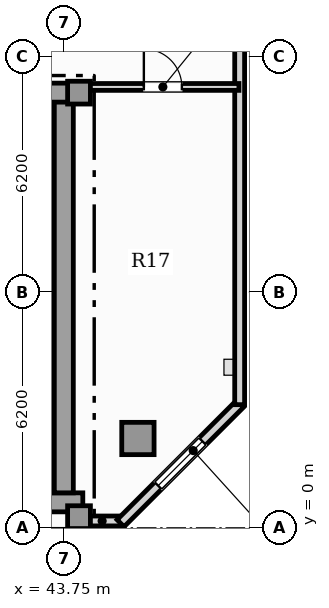
"""IFC4 building model, lengths in metres.
Left out: names, types, materials, properties, quantities, classifications, styles, units other than length and angle.
Written with IfcOpenShell. Run it as: python <this file> out.ifc"""

import sys

from ifc_helpers import new_model, si_unit, direction, frame, frame_2d, origin, origin_2d, place, context, subcontext, project, spatial, rectangle, hollow_rectangle, extrude, element, fill, save


model = new_model("IFC4")
c1 = context("Model", 3, precision=1e-05, world=origin(), true_north=direction((0.0, 1.0)))
c2 = subcontext(c1, "Body", "Model", "MODEL_VIEW")
j1 = project(units=[si_unit("LENGTHUNIT", "METRE"), si_unit("PLANEANGLEUNIT", "RADIAN")], contexts=[c1])
p1 = place(None, origin())
s1 = spatial("IfcSite", under=j1, at=p1, CompositionType="ELEMENT")
p2 = place(p1, origin())
s2 = spatial("IfcBuilding", under=s1, at=p2, CompositionType="ELEMENT")
p3 = place(p2, frame((0.0, 0.0, 316.9)))
s3 = spatial("IfcBuildingStorey", under=s2, at=p3, CompositionType="ELEMENT", Elevation=316.9)
p4 = place(p3, frame((13.25, 0.67, 0.0), z_axis=(0.0, 0.0, 1.0), x_axis=(1.0, 0.0, 0.0)))
e1 = element("IfcWall", 1, at=p4, inside=s3, PredefinedType="SHEAR", context=c2, shape_type="SweptSolid", body=[
    extrude(rectangle(XDim=31.0, YDim=0.5, at=frame_2d((15.5, 0.0))), origin(), (0.0, 0.0, 1.0), 3.65),
])
p5 = place(p3, frame((43.75, 0.92, 0.0), z_axis=(0.0, 0.0, 1.0), x_axis=(0.0, 1.0, 0.0)))
e2 = element("IfcWall", 2, at=p5, inside=s3, PredefinedType="SHEAR", context=c2, shape_type="SweptSolid", body=[
    extrude(rectangle(XDim=10.53, YDim=0.5, at=frame_2d((5.265, 0.0))), origin(), (0.0, 0.0, 1.0), 3.65),
])
p6 = place(p3, frame((41.3, 11.45, 0.0), z_axis=(0.0, 0.0, 1.0), x_axis=(1.0, 0.0, 0.0)))
e3 = element("IfcWall", 3, at=p6, inside=s3, PredefinedType="SHEAR", context=c2, shape_type="SweptSolid", body=[
    extrude(rectangle(XDim=2.95, YDim=0.5, at=frame_2d((1.475, 0.0))), origin(), (0.0, 0.0, 1.0), 3.65),
])
for number, where, z_axis, x_axis in (
    (4, (44.15, 0.28, 0.0), (0.0, 0.0, 1.0), (1.0, 0.0, 0.0)),
    (5, (44.15, 11.45, 0.0), (0.0, 0.0, 1.0), (1.0, 0.0, 0.0)),
):
    element("IfcColumn", number, at=place(p3, frame(where, z_axis=z_axis, x_axis=x_axis)), inside=s3, PredefinedType="COLUMN", context=c2, shape_type="SweptSolid", body=[
        extrude(rectangle(XDim=0.6, YDim=0.6, at=origin_2d()), origin(), (0.0, 0.0, 1.0), 3.85),
    ])
p7 = place(p3, frame((45.7, 2.35, 0.0), z_axis=(0.0, 0.0, 1.0), x_axis=(1.0, 0.0, 0.0)))
e6 = element("IfcColumn", 6, at=p7, inside=s3, PredefinedType="USERDEFINED", context=c2, shape_type="SweptSolid", body=[
    extrude(hollow_rectangle(XDim=0.85, YDim=0.85, WallThickness=0.05, at=origin_2d()), origin(), (0.0, 0.0, 1.0), 3.85),
])
p8 = place(p3, frame((44.25, 0.18, 0.0), z_axis=(0.0, 0.0, 1.0), x_axis=(1.0, 0.0, 0.0)))
e7 = element("IfcWall", 7, at=p8, inside=s3, PredefinedType="SOLIDWALL", context=c2, shape_type="SweptSolid", body=[
    extrude(rectangle(XDim=1.017, YDim=0.26, at=frame_2d((0.509, 0.0))), origin(), (0.0, 0.0, 1.0), 3.65),
])
p9 = place(p3, frame((45.243, 0.12, 0.0), z_axis=(0.0, 0.0, 1.0), x_axis=(0.707079321262, 0.707134240044, 0.0)))
e8 = element("IfcWall", 8, at=p9, inside=s3, PredefinedType="SOLIDWALL", context=c2, shape_type="SweptSolid", body=[
    extrude(rectangle(XDim=4.446, YDim=0.26, at=frame_2d((2.223, 0.0))), origin(), (0.0, 0.0, 1.0), 3.65),
])
p10 = place(p9, frame((1.398, 0.0, 0.88)))
e9 = element("IfcOpeningElement", 9, at=p10, cuts=e8, PredefinedType="OPENING", context=c2, shape_type="SweptSolid", body=[
    extrude(rectangle(XDim=1.65, YDim=2.0, at=frame_2d((0.825, 1.0))), frame((0.0, 0.14, 0.0), z_axis=(0.0, -1.0, 0.0), x_axis=(1.0, 0.0, 0.0)), (0.0, 0.0, 1.0), 0.28),
])
p11 = place(p3, frame((48.377, 3.24, 0.0), z_axis=(0.0, 0.0, 1.0), x_axis=(0.0, 1.0, 0.0)))
e10 = element("IfcWall", 10, at=p11, inside=s3, PredefinedType="SOLIDWALL", context=c2, shape_type="SweptSolid", body=[
    extrude(rectangle(XDim=26.402, YDim=0.26, at=frame_2d((13.201, 0.0))), origin(), (0.0, 0.0, 1.0), 3.65),
])
p12 = place(p11, frame((12.856, 0.0, 0.88)))
e11 = element("IfcOpeningElement", 11, at=p12, cuts=e10, PredefinedType="OPENING", context=c2, shape_type="SweptSolid", body=[
    extrude(rectangle(XDim=1.65, YDim=2.0, at=frame_2d((0.825, 1.0))), frame((0.0, 0.14, 0.0), z_axis=(0.0, -1.0, 0.0), x_axis=(1.0, 0.0, 0.0)), (0.0, 0.0, 1.0), 0.28),
])
p13 = place(p11, frame((15.274, 0.0, 0.88)))
e12 = element("IfcOpeningElement", 12, at=p13, cuts=e10, PredefinedType="OPENING", context=c2, shape_type="SweptSolid", body=[
    extrude(rectangle(XDim=1.65, YDim=2.0, at=frame_2d((0.825, 1.0))), frame((0.0, 0.14, 0.0), z_axis=(0.0, -1.0, 0.0), x_axis=(1.0, 0.0, 0.0)), (0.0, 0.0, 1.0), 0.28),
])
p14 = place(p11, frame((17.961, 0.0, 0.88)))
e13 = element("IfcOpeningElement", 13, at=p14, cuts=e10, PredefinedType="OPENING", context=c2, shape_type="SweptSolid", body=[
    extrude(rectangle(XDim=1.65, YDim=2.0, at=frame_2d((0.825, 1.0))), frame((0.0, 0.14, 0.0), z_axis=(0.0, -1.0, 0.0), x_axis=(1.0, 0.0, 0.0)), (0.0, 0.0, 1.0), 0.28),
])
p15 = place(p11, frame((21.212, 0.0, 0.88)))
e14 = element("IfcOpeningElement", 14, at=p15, cuts=e10, PredefinedType="OPENING", context=c2, shape_type="SweptSolid", body=[
    extrude(rectangle(XDim=1.65, YDim=2.0, at=frame_2d((0.825, 1.0))), frame((0.0, 0.14, 0.0), z_axis=(0.0, -1.0, 0.0), x_axis=(1.0, 0.0, 0.0)), (0.0, 0.0, 1.0), 0.28),
])
p16 = place(p3, frame((40.06, 8.52, 0.0), z_axis=(0.0, 0.0, 1.0), x_axis=(1.0, 0.0, 0.0)))
e15 = element("IfcWall", 15, at=p16, inside=s3, PredefinedType="SOLIDWALL", context=c2, shape_type="SweptSolid", body=[
    extrude(rectangle(XDim=3.4, YDim=0.22, at=frame_2d((1.7, 0.0))), origin(), (0.0, 0.0, 1.0), 3.65),
])
p17 = place(p16, frame((1.125, 0.0, 0.0)))
e16 = element("IfcOpeningElement", 16, at=p17, cuts=e15, PredefinedType="OPENING", context=c2, shape_type="SweptSolid", body=[
    extrude(rectangle(XDim=1.15, YDim=2.2, at=frame_2d((0.575, 1.1))), frame((0.0, 0.12, 0.0), z_axis=(0.0, -1.0, 0.0), x_axis=(1.0, 0.0, 0.0)), (0.0, 0.0, 1.0), 0.24),
])
p18 = place(p3, frame((44.355, 11.6, 0.0), z_axis=(0.0, 0.0, 1.0), x_axis=(1.0, 0.0, 0.0)))
e17 = element("IfcWall", 17, at=p18, inside=s3, PredefinedType="PARTITIONING", context=c2, shape_type="SweptSolid", body=[
    extrude(rectangle(XDim=4.002, YDim=0.18, at=frame_2d((2.001, 0.0))), origin(), (0.0, 0.0, 1.0), 3.65),
])
p19 = place(p18, frame((1.501, 0.0, 0.0)))
e18 = element("IfcOpeningElement", 18, at=p19, cuts=e17, PredefinedType="OPENING", context=c2, shape_type="SweptSolid", body=[
    extrude(rectangle(XDim=1.0, YDim=2.15, at=frame_2d((0.5, 1.075))), frame((0.0, 0.1, 0.0), z_axis=(0.0, -1.0, 0.0), x_axis=(1.0, 0.0, 0.0)), (0.0, 0.0, 1.0), 0.2),
])
p20 = place(p10, origin())
e19 = element("IfcWindow", 19, at=p20, inside=s3, PartitioningType="SINGLE_PANEL", PredefinedType="WINDOW", context=c2, shape_type="SweptSolid", body=[
    extrude(rectangle(XDim=1.65, YDim=2.0, at=frame_2d((0.825, 1.0))), frame((0.0, 0.03, 0.0), z_axis=(0.0, -1.0, 0.0), x_axis=(1.0, 0.0, 0.0)), (0.0, 0.0, 1.0), 0.06),
])
fill(e9, e19)
p21 = place(p19, origin())
e20 = element("IfcDoor", 20, at=p21, inside=s3, OperationType="SINGLE_SWING_LEFT", PredefinedType="DOOR", context=c2, shape_type="SweptSolid", body=[
    extrude(rectangle(XDim=1.0, YDim=2.15, at=frame_2d((0.5, 1.075))), frame((0.0, 0.025, 0.0), z_axis=(0.0, -1.0, 0.0), x_axis=(1.0, 0.0, 0.0)), (0.0, 0.0, 1.0), 0.05),
])
fill(e18, e20)
save(model, sys.argv[1])
